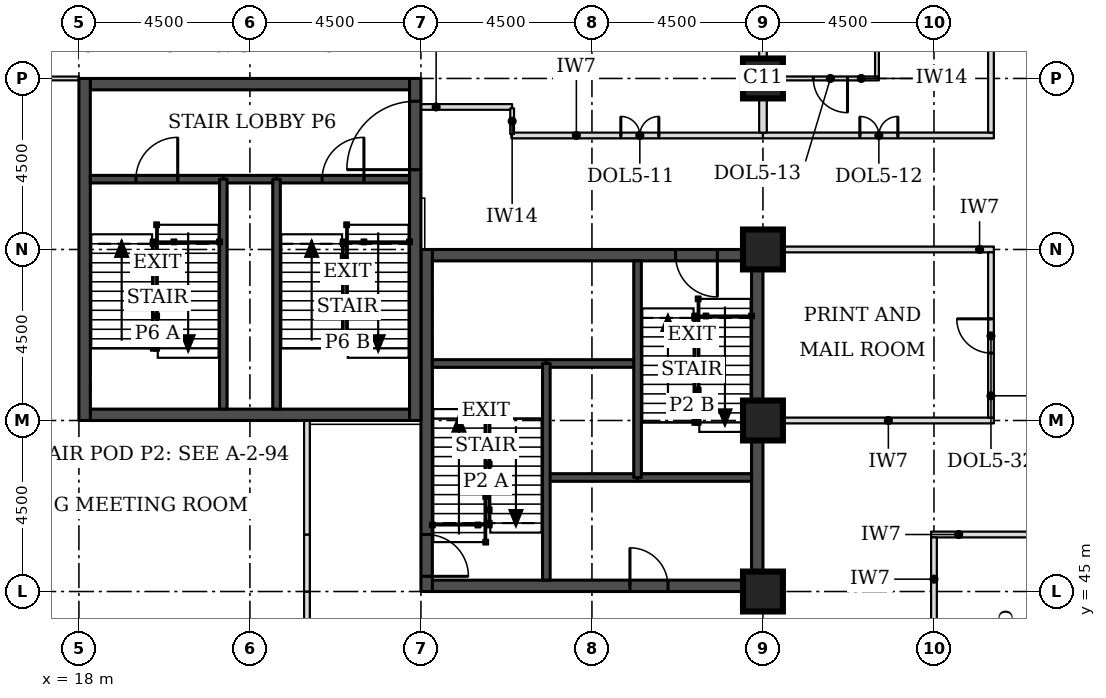
"""IFC4 building model, lengths in metres.
Left out: names, types, materials, properties, quantities, classifications, styles, units other than length and angle.
Written with IfcOpenShell. Run it as: python <this file> out.ifc"""

import sys

from ifc_helpers import new_model, si_unit, direction, frame, frame_2d, origin, origin_2d, place, context, subcontext, project, spatial, rectangle, extrude, element, fill, save


model = new_model("IFC4")
c1 = context("Model", 3, precision=1e-05, world=origin(), true_north=direction((0.0, 1.0)))
c2 = subcontext(c1, "Body", "Model", "MODEL_VIEW")
j1 = project(units=[si_unit("LENGTHUNIT", "METRE"), si_unit("PLANEANGLEUNIT", "RADIAN")], contexts=[c1])
p1 = place(None, origin())
s1 = spatial("IfcSite", under=j1, at=p1, CompositionType="ELEMENT")
p2 = place(p1, origin())
s2 = spatial("IfcBuilding", under=s1, at=p2, CompositionType="ELEMENT")
p3 = place(p2, frame((0.0, 0.0, 108.5)))
s3 = spatial("IfcBuildingStorey", under=s2, at=p3, CompositionType="ELEMENT", Elevation=108.5)
for number, where, z_axis, x_axis in (
    (1, (36.0, 45.0, 0.0), (0.0, 0.0, 1.0), (1.0, 0.0, 0.0)),
    (2, (36.0, 49.5, 0.0), (0.0, 0.0, 1.0), (1.0, 0.0, 0.0)),
    (3, (36.0, 54.0, 0.0), (0.0, 0.0, 1.0), (1.0, 0.0, 0.0)),
    (4, (36.0, 58.5, 0.0), (0.0, 0.0, 1.0), (1.0, 0.0, 0.0)),
):
    element("IfcColumn", number, at=place(p3, frame(where, z_axis=z_axis, x_axis=x_axis)), inside=s3, PredefinedType="COLUMN", context=c2, shape_type="SweptSolid", body=[
        extrude(rectangle(XDim=1.05, YDim=1.05, at=origin_2d()), origin(), (0.0, 0.0, 1.0), 3.7),
    ])
p4 = place(p3, frame((27.3, 45.15, 0.0), z_axis=(0.0, 0.0, 1.0), x_axis=(1.0, 0.0, 0.0)))
e5 = element("IfcWall", 5, at=p4, inside=s3, PredefinedType="SHEAR", context=c2, shape_type="SweptSolid", body=[
    extrude(rectangle(XDim=8.4, YDim=0.3, at=frame_2d((4.2, 0.0))), origin(), (0.0, 0.0, 1.0), 3.7),
])
p5 = place(p4, frame((5.2, 0.0, 0.0)))
e6 = element("IfcOpeningElement", 6, at=p5, cuts=e5, PredefinedType="OPENING", context=c2, shape_type="SweptSolid", body=[
    extrude(rectangle(XDim=1.0, YDim=2.1, at=frame_2d((0.5, 1.05))), frame((0.0, 0.16, 0.0), z_axis=(0.0, -1.0, 0.0), x_axis=(1.0, 0.0, 0.0)), (0.0, 0.0, 1.0), 0.32),
])
p6 = place(p3, frame((27.3, 53.85, 0.0), z_axis=(0.0, 0.0, 1.0), x_axis=(1.0, 0.0, 0.0)))
e7 = element("IfcWall", 7, at=p6, inside=s3, PredefinedType="SHEAR", context=c2, shape_type="SweptSolid", body=[
    extrude(rectangle(XDim=8.4, YDim=0.3, at=frame_2d((4.2, 0.0))), origin(), (0.0, 0.0, 1.0), 3.7),
])
p7 = place(p6, frame((6.4, 0.0, 0.0)))
e8 = element("IfcOpeningElement", 8, at=p7, cuts=e7, PredefinedType="OPENING", context=c2, shape_type="SweptSolid", body=[
    extrude(rectangle(XDim=1.1, YDim=2.1, at=frame_2d((0.55, 1.05))), frame((0.0, 0.16, 0.0), z_axis=(0.0, -1.0, 0.0), x_axis=(1.0, 0.0, 0.0)), (0.0, 0.0, 1.0), 0.32),
])
p8 = place(p3, frame((27.15, 45.0, 0.0), z_axis=(0.0, 0.0, 1.0), x_axis=(0.0, 1.0, 0.0)))
e9 = element("IfcWall", 9, at=p8, inside=s3, PredefinedType="SHEAR", context=c2, shape_type="SweptSolid", body=[
    extrude(rectangle(XDim=9.0, YDim=0.3, at=frame_2d((4.5, 0.0))), origin(), (0.0, 0.0, 1.0), 3.7),
])
p9 = place(p8, frame((0.4, 0.0, 0.0)))
e10 = element("IfcOpeningElement", 10, at=p9, cuts=e9, PredefinedType="OPENING", context=c2, shape_type="SweptSolid", body=[
    extrude(rectangle(XDim=1.1, YDim=2.1, at=frame_2d((0.55, 1.05))), frame((0.0, 0.16, 0.0), z_axis=(0.0, -1.0, 0.0), x_axis=(1.0, 0.0, 0.0)), (0.0, 0.0, 1.0), 0.32),
])
p10 = place(p3, frame((35.85, 45.0, 0.0), z_axis=(0.0, 0.0, 1.0), x_axis=(0.0, 1.0, 0.0)))
e11 = element("IfcWall", 11, at=p10, inside=s3, PredefinedType="SHEAR", context=c2, shape_type="SweptSolid", body=[
    extrude(rectangle(XDim=9.0, YDim=0.3, at=frame_2d((4.5, 0.0))), origin(), (0.0, 0.0, 1.0), 3.7),
])
for number, where, z_axis, x_axis in (
    (12, (18.3, 49.65, 0.0), (0.0, 0.0, 1.0), (1.0, 0.0, 0.0)),
    (13, (18.3, 58.35, 0.0), (0.0, 0.0, 1.0), (1.0, 0.0, 0.0)),
):
    element("IfcWall", number, at=place(p3, frame(where, z_axis=z_axis, x_axis=x_axis)), inside=s3, PredefinedType="SHEAR", context=c2, shape_type="SweptSolid", body=[
        extrude(rectangle(XDim=8.4, YDim=0.3, at=frame_2d((4.2, 0.0))), origin(), (0.0, 0.0, 1.0), 3.7),
    ])
p11 = place(p3, frame((18.15, 49.5, 0.0), z_axis=(0.0, 0.0, 1.0), x_axis=(0.0, 1.0, 0.0)))
e14 = element("IfcWall", 14, at=p11, inside=s3, PredefinedType="SHEAR", context=c2, shape_type="SweptSolid", body=[
    extrude(rectangle(XDim=9.0, YDim=0.3, at=frame_2d((4.5, 0.0))), origin(), (0.0, 0.0, 1.0), 3.7),
])
p12 = place(p3, frame((26.85, 49.5, 0.0), z_axis=(0.0, 0.0, 1.0), x_axis=(0.0, 1.0, 0.0)))
e15 = element("IfcWall", 15, at=p12, inside=s3, PredefinedType="SHEAR", context=c2, shape_type="SweptSolid", body=[
    extrude(rectangle(XDim=9.0, YDim=0.3, at=frame_2d((4.5, 0.0))), origin(), (0.0, 0.0, 1.0), 3.7),
])
p13 = place(p12, frame((6.6, 0.0, 0.0)))
e16 = element("IfcOpeningElement", 16, at=p13, cuts=e15, PredefinedType="OPENING", context=c2, shape_type="SweptSolid", body=[
    extrude(rectangle(XDim=1.8, YDim=2.1, at=frame_2d((0.9, 1.05))), frame((0.0, 0.16, 0.0), z_axis=(0.0, -1.0, 0.0), x_axis=(1.0, 0.0, 0.0)), (0.0, 0.0, 1.0), 0.32),
])
p14 = place(p3, frame((17.761, 63.751, 0.0), z_axis=(0.0, 0.0, 1.0), x_axis=(-0.707106781187, -0.707106781187, 0.0)))
e17 = element("IfcWall", 17, at=p14, inside=s3, PredefinedType="STANDARD", context=c2, shape_type="SweptSolid", body=[
    extrude(rectangle(XDim=7.089, YDim=0.35, at=frame_2d((3.544, 0.0))), origin(), (0.0, 0.0, 1.0), 3.525),
])
p15 = place(p14, frame((1.894, 0.0, 0.9)))
e18 = element("IfcOpeningElement", 18, at=p15, cuts=e17, PredefinedType="OPENING", context=c2, shape_type="SweptSolid", body=[
    extrude(rectangle(XDim=3.3, YDim=1.9, at=frame_2d((1.65, 0.95))), frame((0.0, 0.185, 0.0), z_axis=(0.0, -1.0, 0.0), x_axis=(1.0, 0.0, 0.0)), (0.0, 0.0, 1.0), 0.37),
])
p16 = place(p3, frame((12.749, 44.761, 0.0), z_axis=(0.0, 0.0, 1.0), x_axis=(0.707106781187, -0.707106781187, 0.0)))
e19 = element("IfcWall", 19, at=p16, inside=s3, PredefinedType="STANDARD", context=c2, shape_type="SweptSolid", body=[
    extrude(rectangle(XDim=7.089, YDim=0.35, at=frame_2d((3.544, 0.0))), origin(), (0.0, 0.0, 1.0), 3.525),
])
p17 = place(p16, frame((1.894, 0.0, 0.9)))
e20 = element("IfcOpeningElement", 20, at=p17, cuts=e19, PredefinedType="OPENING", context=c2, shape_type="SweptSolid", body=[
    extrude(rectangle(XDim=3.3, YDim=1.9, at=frame_2d((1.65, 0.95))), frame((0.0, 0.185, 0.0), z_axis=(0.0, -1.0, 0.0), x_axis=(1.0, 0.0, 0.0)), (0.0, 0.0, 1.0), 0.37),
])
p18 = place(p3, frame((40.425, 46.5, 0.0), z_axis=(0.0, 0.0, 1.0), x_axis=(1.0, 0.0, 0.0)))
e21 = element("IfcWall", 21, at=p18, inside=s3, PredefinedType="PARTITIONING", context=c2, shape_type="SweptSolid", body=[
    extrude(rectangle(XDim=4.65, YDim=0.15, at=frame_2d((2.325, 0.0))), origin(), (0.0, 0.0, 1.0), 3.55),
])
for number, where, z_axis, x_axis in (
    (22, (36.525, 49.5, 0.0), (0.0, 0.0, 1.0), (1.0, 0.0, 0.0)),
    (23, (36.525, 54.0, 0.0), (0.0, 0.0, 1.0), (1.0, 0.0, 0.0)),
):
    element("IfcWall", number, at=place(p3, frame(where, z_axis=z_axis, x_axis=x_axis)), inside=s3, PredefinedType="PARTITIONING", context=c2, shape_type="SweptSolid", body=[
        extrude(rectangle(XDim=5.55, YDim=0.15, at=frame_2d((2.775, 0.0))), origin(), (0.0, 0.0, 1.0), 3.55),
    ])
p19 = place(p3, frame((29.38, 57.0, 0.0), z_axis=(0.0, 0.0, 1.0), x_axis=(1.0, 0.0, 0.0)))
e24 = element("IfcWall", 24, at=p19, inside=s3, PredefinedType="PARTITIONING", context=c2, shape_type="SweptSolid", body=[
    extrude(rectangle(XDim=6.62, YDim=0.15, at=frame_2d((3.31, 0.0))), origin(), (0.0, 0.0, 1.0), 3.55),
])
p20 = place(p19, frame((2.88, 0.0, 0.0)))
e25 = element("IfcOpeningElement", 25, at=p20, cuts=e24, PredefinedType="OPENING", context=c2, shape_type="SweptSolid", body=[
    extrude(rectangle(XDim=1.0, YDim=2.1, at=frame_2d((0.5, 1.05))), frame((0.0, 0.085, 0.0), z_axis=(0.0, -1.0, 0.0), x_axis=(1.0, 0.0, 0.0)), (0.0, 0.0, 1.0), 0.17),
])
p21 = place(p3, frame((36.0, 57.0, 0.0), z_axis=(0.0, 0.0, 1.0), x_axis=(1.0, 0.0, 0.0)))
e26 = element("IfcWall", 26, at=p21, inside=s3, PredefinedType="PARTITIONING", context=c2, shape_type="SweptSolid", body=[
    extrude(rectangle(XDim=6.075, YDim=0.15, at=frame_2d((3.038, 0.0))), origin(), (0.0, 0.0, 1.0), 3.55),
])
p22 = place(p21, frame((2.55, 0.0, 0.0)))
e27 = element("IfcOpeningElement", 27, at=p22, cuts=e26, PredefinedType="OPENING", context=c2, shape_type="SweptSolid", body=[
    extrude(rectangle(XDim=1.0, YDim=2.1, at=frame_2d((0.5, 1.05))), frame((0.0, 0.085, 0.0), z_axis=(0.0, -1.0, 0.0), x_axis=(1.0, 0.0, 0.0)), (0.0, 0.0, 1.0), 0.17),
])
p23 = place(p3, frame((36.525, 58.5, 0.0), z_axis=(0.0, 0.0, 1.0), x_axis=(1.0, 0.0, 0.0)))
e28 = element("IfcWall", 28, at=p23, inside=s3, PredefinedType="PARTITIONING", context=c2, shape_type="SweptSolid", body=[
    extrude(rectangle(XDim=2.525, YDim=0.1, at=frame_2d((1.263, 0.0))), origin(), (0.0, 0.0, 1.0), 3.55),
])
p24 = place(p23, frame((0.8, 0.0, 0.0)))
e29 = element("IfcOpeningElement", 29, at=p24, cuts=e28, PredefinedType="OPENING", context=c2, shape_type="SweptSolid", body=[
    extrude(rectangle(XDim=0.9, YDim=2.1, at=frame_2d((0.45, 1.05))), frame((0.0, 0.06, 0.0), z_axis=(0.0, -1.0, 0.0), x_axis=(1.0, 0.0, 0.0)), (0.0, 0.0, 1.0), 0.12),
])
p25 = place(p3, frame((24.0, 39.975, 0.0), z_axis=(0.0, 0.0, 1.0), x_axis=(0.0, 1.0, 0.0)))
e30 = element("IfcWall", 30, at=p25, inside=s3, PredefinedType="PARTITIONING", context=c2, shape_type="SweptSolid", body=[
    extrude(rectangle(XDim=5.025, YDim=0.15, at=frame_2d((2.512, 0.0))), origin(), (0.0, 0.0, 1.0), 3.55),
])
p26 = place(p3, frame((40.5, 41.025, 0.0), z_axis=(0.0, 0.0, 1.0), x_axis=(0.0, 1.0, 0.0)))
e31 = element("IfcWall", 31, at=p26, inside=s3, PredefinedType="PARTITIONING", context=c2, shape_type="SweptSolid", body=[
    extrude(rectangle(XDim=5.4, YDim=0.15, at=frame_2d((2.7, 0.0))), origin(), (0.0, 0.0, 1.0), 3.55),
])
p27 = place(p26, frame((2.25, 0.0, 0.0)))
e32 = element("IfcOpeningElement", 32, at=p27, cuts=e31, PredefinedType="OPENING", context=c2, shape_type="SweptSolid", body=[
    extrude(rectangle(XDim=0.9, YDim=2.1, at=frame_2d((0.45, 1.05))), frame((0.0, 0.085, 0.0), z_axis=(0.0, -1.0, 0.0), x_axis=(1.0, 0.0, 0.0)), (0.0, 0.0, 1.0), 0.17),
])
p28 = place(p3, frame((24.0, 45.0, 0.0), z_axis=(0.0, 0.0, 1.0), x_axis=(0.0, 1.0, 0.0)))
e33 = element("IfcWall", 33, at=p28, inside=s3, PredefinedType="PARTITIONING", context=c2, shape_type="SweptSolid", body=[
    extrude(rectangle(XDim=1.5, YDim=0.15, at=frame_2d((0.75, 0.0))), origin(), (0.0, 0.0, 1.0), 3.55),
])
p29 = place(p3, frame((24.0, 46.5, 0.0), z_axis=(0.0, 0.0, 1.0), x_axis=(0.0, 1.0, 0.0)))
e34 = element("IfcWall", 34, at=p29, inside=s3, PredefinedType="PARTITIONING", context=c2, shape_type="SweptSolid", body=[
    extrude(rectangle(XDim=3.0, YDim=0.15, at=frame_2d((1.5, 0.0))), origin(), (0.0, 0.0, 1.0), 3.55),
])
p30 = place(p3, frame((42.0, 49.575, 0.0), z_axis=(0.0, 0.0, 1.0), x_axis=(0.0, 1.0, 0.0)))
e35 = element("IfcWall", 35, at=p30, inside=s3, PredefinedType="PARTITIONING", context=c2, shape_type="SweptSolid", body=[
    extrude(rectangle(XDim=4.35, YDim=0.15, at=frame_2d((2.175, 0.0))), origin(), (0.0, 0.0, 1.0), 3.55),
])
p31 = place(p30, frame((1.7, 0.0, 0.0)))
e36 = element("IfcOpeningElement", 36, at=p31, cuts=e35, PredefinedType="OPENING", context=c2, shape_type="SweptSolid", body=[
    extrude(rectangle(XDim=0.9, YDim=2.1, at=frame_2d((0.45, 1.05))), frame((0.0, 0.085, 0.0), z_axis=(0.0, -1.0, 0.0), x_axis=(1.0, 0.0, 0.0)), (0.0, 0.0, 1.0), 0.17),
])
p32 = place(p3, frame((36.0, 57.075, 0.0), z_axis=(0.0, 0.0, 1.0), x_axis=(0.0, 1.0, 0.0)))
e37 = element("IfcWall", 37, at=p32, inside=s3, PredefinedType="PARTITIONING", context=c2, shape_type="SweptSolid", body=[
    extrude(rectangle(XDim=0.9, YDim=0.2, at=frame_2d((0.45, 0.0))), origin(), (0.0, 0.0, 1.0), 2.8),
])
p33 = place(p3, frame((42.0, 57.075, 0.0), z_axis=(0.0, 0.0, 1.0), x_axis=(0.0, 1.0, 0.0)))
e38 = element("IfcWall", 38, at=p33, inside=s3, PredefinedType="PARTITIONING", context=c2, shape_type="SweptSolid", body=[
    extrude(rectangle(XDim=17.825, YDim=0.15, at=frame_2d((8.913, 0.0))), origin(), (0.0, 0.0, 1.0), 3.55),
])
p34 = place(p3, frame((39.0, 58.55, 0.0), z_axis=(0.0, 0.0, 1.0), x_axis=(0.0, 1.0, 0.0)))
e39 = element("IfcWall", 39, at=p34, inside=s3, PredefinedType="PARTITIONING", context=c2, shape_type="SweptSolid", body=[
    extrude(rectangle(XDim=4.45, YDim=0.1, at=frame_2d((2.225, 0.0))), origin(), (0.0, 0.0, 1.0), 3.55),
])
p35 = place(p3, frame((36.0, 58.995, 0.0), z_axis=(0.0, 0.0, 1.0), x_axis=(0.0, 1.0, 0.0)))
e40 = element("IfcWall", 40, at=p35, inside=s3, PredefinedType="PARTITIONING", context=c2, shape_type="SweptSolid", body=[
    extrude(rectangle(XDim=1.005, YDim=0.2, at=frame_2d((0.502, 0.0))), origin(), (0.0, 0.0, 1.0), 2.8),
])
p36 = place(p3, frame((13.5, 58.5, 0.0), z_axis=(0.0, 0.0, 1.0), x_axis=(1.0, 0.0, 0.0)))
e41 = element("IfcWall", 41, at=p36, inside=s3, PredefinedType="PARTITIONING", context=c2, shape_type="SweptSolid", body=[
    extrude(rectangle(XDim=4.5, YDim=0.1, at=frame_2d((2.25, 0.0))), origin(), (0.0, 0.0, 1.0), 2.55),
])
p37 = place(p36, frame((1.8, 0.0, 0.0)))
e42 = element("IfcOpeningElement", 42, at=p37, cuts=e41, PredefinedType="OPENING", context=c2, shape_type="SweptSolid", body=[
    extrude(rectangle(XDim=0.9, YDim=2.1, at=frame_2d((0.45, 1.05))), frame((0.0, 0.06, 0.0), z_axis=(0.0, -1.0, 0.0), x_axis=(1.0, 0.0, 0.0)), (0.0, 0.0, 1.0), 0.12),
])
p38 = place(p3, frame((27.0, 57.75, 0.0), z_axis=(0.0, 0.0, 1.0), x_axis=(1.0, 0.0, 0.0)))
e43 = element("IfcWall", 43, at=p38, inside=s3, PredefinedType="PARTITIONING", context=c2, shape_type="SweptSolid", body=[
    extrude(rectangle(XDim=2.4, YDim=0.15, at=frame_2d((1.2, 0.0))), origin(), (0.0, 0.0, 1.0), 3.55),
])
p39 = place(p3, frame((29.4, 57.715, 0.0), z_axis=(0.0, 0.0, 1.0), x_axis=(0.0, -1.0, 0.0)))
e44 = element("IfcWall", 44, at=p39, inside=s3, PredefinedType="PARTITIONING", context=c2, shape_type="SweptSolid", body=[
    extrude(rectangle(XDim=0.68, YDim=0.1, at=frame_2d((0.34, 0.0))), origin(), (0.0, 0.0, 1.0), 3.55),
])
p40 = place(p3, frame((30.3, 48.0, 0.0), z_axis=(0.0, 0.0, 1.0), x_axis=(1.0, 0.0, 0.0)))
e45 = element("IfcWall", 45, at=p40, inside=s3, PredefinedType="SOLIDWALL", context=c2, shape_type="SweptSolid", body=[
    extrude(rectangle(XDim=2.4, YDim=0.2, at=frame_2d((1.2, 0.0))), origin(), (0.0, 0.0, 1.0), 3.55),
])
p41 = place(p3, frame((32.7, 48.0, 0.0), z_axis=(0.0, 0.0, 1.0), x_axis=(1.0, 0.0, 0.0)))
e46 = element("IfcWall", 46, at=p41, inside=s3, PredefinedType="SOLIDWALL", context=c2, shape_type="SweptSolid", body=[
    extrude(rectangle(XDim=3.0, YDim=0.2, at=frame_2d((1.5, 0.0))), origin(), (0.0, 0.0, 1.0), 3.55),
])
p42 = place(p3, frame((30.3, 51.0, 0.0), z_axis=(0.0, 0.0, 1.0), x_axis=(1.0, 0.0, 0.0)))
e47 = element("IfcWall", 47, at=p42, inside=s3, PredefinedType="SOLIDWALL", context=c2, shape_type="SweptSolid", body=[
    extrude(rectangle(XDim=2.4, YDim=0.2, at=frame_2d((1.2, 0.0))), origin(), (0.0, 0.0, 1.0), 3.7),
])
p43 = place(p3, frame((27.3, 51.0, 0.0), z_axis=(0.0, 0.0, 1.0), x_axis=(1.0, 0.0, 0.0)))
e48 = element("IfcWall", 48, at=p43, inside=s3, PredefinedType="SOLIDWALL", context=c2, shape_type="SweptSolid", body=[
    extrude(rectangle(XDim=3.0, YDim=0.2, at=frame_2d((1.5, 0.0))), origin(), (0.0, 0.0, 1.0), 3.55),
])
for number, where, z_axis, x_axis in (
    (49, (30.3, 45.3, 0.0), (0.0, 0.0, 1.0), (0.0, 1.0, 0.0)),
    (50, (32.7, 48.0, 0.0), (0.0, 0.0, 1.0), (0.0, 1.0, 0.0)),
):
    element("IfcWall", number, at=place(p3, frame(where, z_axis=z_axis, x_axis=x_axis)), inside=s3, PredefinedType="SOLIDWALL", context=c2, shape_type="SweptSolid", body=[
        extrude(rectangle(XDim=5.7, YDim=0.2, at=frame_2d((2.85, 0.0))), origin(), (0.0, 0.0, 1.0), 3.55),
    ])
p44 = place(p3, frame((21.8, 55.85, 0.0), z_axis=(0.0, 0.0, 1.0), x_axis=(1.0, 0.0, 0.0)))
e51 = element("IfcWall", 51, at=p44, inside=s3, PredefinedType="SOLIDWALL", context=c2, shape_type="SweptSolid", body=[
    extrude(rectangle(XDim=1.4, YDim=0.2, at=frame_2d((0.7, 0.0))), origin(), (0.0, 0.0, 1.0), 3.55),
])
p45 = place(p3, frame((18.3, 55.85, 0.0), z_axis=(0.0, 0.0, 1.0), x_axis=(1.0, 0.0, 0.0)))
e52 = element("IfcWall", 52, at=p45, inside=s3, PredefinedType="SOLIDWALL", context=c2, shape_type="SweptSolid", body=[
    extrude(rectangle(XDim=3.5, YDim=0.2, at=frame_2d((1.75, 0.0))), origin(), (0.0, 0.0, 1.0), 3.55),
])
p46 = place(p45, frame((1.2, 0.0, 0.0)))
e53 = element("IfcOpeningElement", 53, at=p46, cuts=e52, PredefinedType="OPENING", context=c2, shape_type="SweptSolid", body=[
    extrude(rectangle(XDim=1.1, YDim=2.1, at=frame_2d((0.55, 1.05))), frame((0.0, 0.11, 0.0), z_axis=(0.0, -1.0, 0.0), x_axis=(1.0, 0.0, 0.0)), (0.0, 0.0, 1.0), 0.22),
])
p47 = place(p3, frame((23.2, 55.85, 0.0), z_axis=(0.0, 0.0, 1.0), x_axis=(1.0, 0.0, 0.0)))
e54 = element("IfcWall", 54, at=p47, inside=s3, PredefinedType="SOLIDWALL", context=c2, shape_type="SweptSolid", body=[
    extrude(rectangle(XDim=3.5, YDim=0.2, at=frame_2d((1.75, 0.0))), origin(), (0.0, 0.0, 1.0), 3.55),
])
p48 = place(p47, frame((1.2, 0.0, 0.0)))
e55 = element("IfcOpeningElement", 55, at=p48, cuts=e54, PredefinedType="OPENING", context=c2, shape_type="SweptSolid", body=[
    extrude(rectangle(XDim=1.1, YDim=2.1, at=frame_2d((0.55, 1.05))), frame((0.0, 0.11, 0.0), z_axis=(0.0, -1.0, 0.0), x_axis=(1.0, 0.0, 0.0)), (0.0, 0.0, 1.0), 0.22),
])
for number, where, z_axis, x_axis in (
    (56, (21.8, 49.8, 0.0), (0.0, 0.0, 1.0), (0.0, 1.0, 0.0)),
    (57, (23.2, 49.8, 0.0), (0.0, 0.0, 1.0), (0.0, 1.0, 0.0)),
):
    element("IfcWall", number, at=place(p3, frame(where, z_axis=z_axis, x_axis=x_axis)), inside=s3, PredefinedType="SOLIDWALL", context=c2, shape_type="SweptSolid", body=[
        extrude(rectangle(XDim=6.05, YDim=0.2, at=frame_2d((3.025, 0.0))), origin(), (0.0, 0.0, 1.0), 3.55),
    ])
p49 = place(p31, origin())
e58 = element("IfcDoor", 58, at=p49, inside=s3, OperationType="SINGLE_SWING_RIGHT", PredefinedType="DOOR", context=c2, shape_type="SweptSolid", body=[
    extrude(rectangle(XDim=0.9, YDim=2.1, at=frame_2d((0.45, 1.05))), frame((0.0, 0.025, 0.0), z_axis=(0.0, -1.0, 0.0), x_axis=(1.0, 0.0, 0.0)), (0.0, 0.0, 1.0), 0.05),
])
fill(e36, e58)
p50 = place(p22, origin())
e59 = element("IfcDoor", 59, at=p50, inside=s3, OperationType="DOUBLE_DOOR_SINGLE_SWING", PredefinedType="DOOR", context=c2, shape_type="SweptSolid", body=[
    extrude(rectangle(XDim=1.0, YDim=2.1, at=frame_2d((0.5, 1.05))), frame((0.0, 0.025, 0.0), z_axis=(0.0, -1.0, 0.0), x_axis=(1.0, 0.0, 0.0)), (0.0, 0.0, 1.0), 0.05),
])
fill(e27, e59)
p51 = place(p24, frame((0.9, 0.0, 0.0), z_axis=(0.0, 0.0, 1.0), x_axis=(-1.0, 0.0, 0.0)))
e60 = element("IfcDoor", 60, at=p51, inside=s3, OperationType="SINGLE_SWING_LEFT", PredefinedType="DOOR", context=c2, shape_type="SweptSolid", body=[
    extrude(rectangle(XDim=0.9, YDim=2.1, at=frame_2d((0.45, 1.05))), frame((0.0, 0.025, 0.0), z_axis=(0.0, -1.0, 0.0), x_axis=(1.0, 0.0, 0.0)), (0.0, 0.0, 1.0), 0.05),
])
fill(e29, e60)
p52 = place(p20, origin())
e61 = element("IfcDoor", 61, at=p52, inside=s3, OperationType="DOUBLE_DOOR_SINGLE_SWING", PredefinedType="DOOR", context=c2, shape_type="SweptSolid", body=[
    extrude(rectangle(XDim=1.0, YDim=2.1, at=frame_2d((0.5, 1.05))), frame((0.0, 0.025, 0.0), z_axis=(0.0, -1.0, 0.0), x_axis=(1.0, 0.0, 0.0)), (0.0, 0.0, 1.0), 0.05),
])
fill(e25, e61)
p53 = place(p9, frame((1.1, 0.0, 0.0), z_axis=(0.0, 0.0, 1.0), x_axis=(-1.0, 0.0, 0.0)))
e62 = element("IfcDoor", 62, at=p53, inside=s3, OperationType="SINGLE_SWING_RIGHT", PredefinedType="DOOR", context=c2, shape_type="SweptSolid", body=[
    extrude(rectangle(XDim=1.1, YDim=2.1, at=frame_2d((0.55, 1.05))), frame((0.0, 0.025, 0.0), z_axis=(0.0, -1.0, 0.0), x_axis=(1.0, 0.0, 0.0)), (0.0, 0.0, 1.0), 0.05),
])
fill(e10, e62)
p54 = place(p7, frame((1.1, 0.0, 0.0), z_axis=(0.0, 0.0, 1.0), x_axis=(-1.0, 0.0, 0.0)))
e63 = element("IfcDoor", 63, at=p54, inside=s3, OperationType="SINGLE_SWING_LEFT", PredefinedType="DOOR", context=c2, shape_type="SweptSolid", body=[
    extrude(rectangle(XDim=1.1, YDim=2.1, at=frame_2d((0.55, 1.05))), frame((0.0, 0.025, 0.0), z_axis=(0.0, -1.0, 0.0), x_axis=(1.0, 0.0, 0.0)), (0.0, 0.0, 1.0), 0.05),
])
fill(e8, e63)
p55 = place(p5, origin())
e64 = element("IfcDoor", 64, at=p55, inside=s3, OperationType="SINGLE_SWING_LEFT", PredefinedType="DOOR", context=c2, shape_type="SweptSolid", body=[
    extrude(rectangle(XDim=1.0, YDim=2.1, at=frame_2d((0.5, 1.05))), frame((0.0, 0.025, 0.0), z_axis=(0.0, -1.0, 0.0), x_axis=(1.0, 0.0, 0.0)), (0.0, 0.0, 1.0), 0.05),
])
fill(e6, e64)
p56 = place(p46, origin())
e65 = element("IfcDoor", 65, at=p56, inside=s3, OperationType="SINGLE_SWING_RIGHT", PredefinedType="DOOR", context=c2, shape_type="SweptSolid", body=[
    extrude(rectangle(XDim=1.1, YDim=2.1, at=frame_2d((0.55, 1.05))), frame((0.0, 0.025, 0.0), z_axis=(0.0, -1.0, 0.0), x_axis=(1.0, 0.0, 0.0)), (0.0, 0.0, 1.0), 0.05),
])
fill(e53, e65)
p57 = place(p48, origin())
e66 = element("IfcDoor", 66, at=p57, inside=s3, OperationType="SINGLE_SWING_RIGHT", PredefinedType="DOOR", context=c2, shape_type="SweptSolid", body=[
    extrude(rectangle(XDim=1.1, YDim=2.1, at=frame_2d((0.55, 1.05))), frame((0.0, 0.025, 0.0), z_axis=(0.0, -1.0, 0.0), x_axis=(1.0, 0.0, 0.0)), (0.0, 0.0, 1.0), 0.05),
])
fill(e55, e66)
p58 = place(p13, origin())
e67 = element("IfcDoor", 67, at=p58, inside=s3, OperationType="SINGLE_SWING_LEFT", PredefinedType="DOOR", context=c2, shape_type="SweptSolid", body=[
    extrude(rectangle(XDim=1.8, YDim=2.1, at=frame_2d((0.9, 1.05))), frame((0.0, 0.025, 0.0), z_axis=(0.0, -1.0, 0.0), x_axis=(1.0, 0.0, 0.0)), (0.0, 0.0, 1.0), 0.05),
])
fill(e16, e67)
save(model, sys.argv[1])
